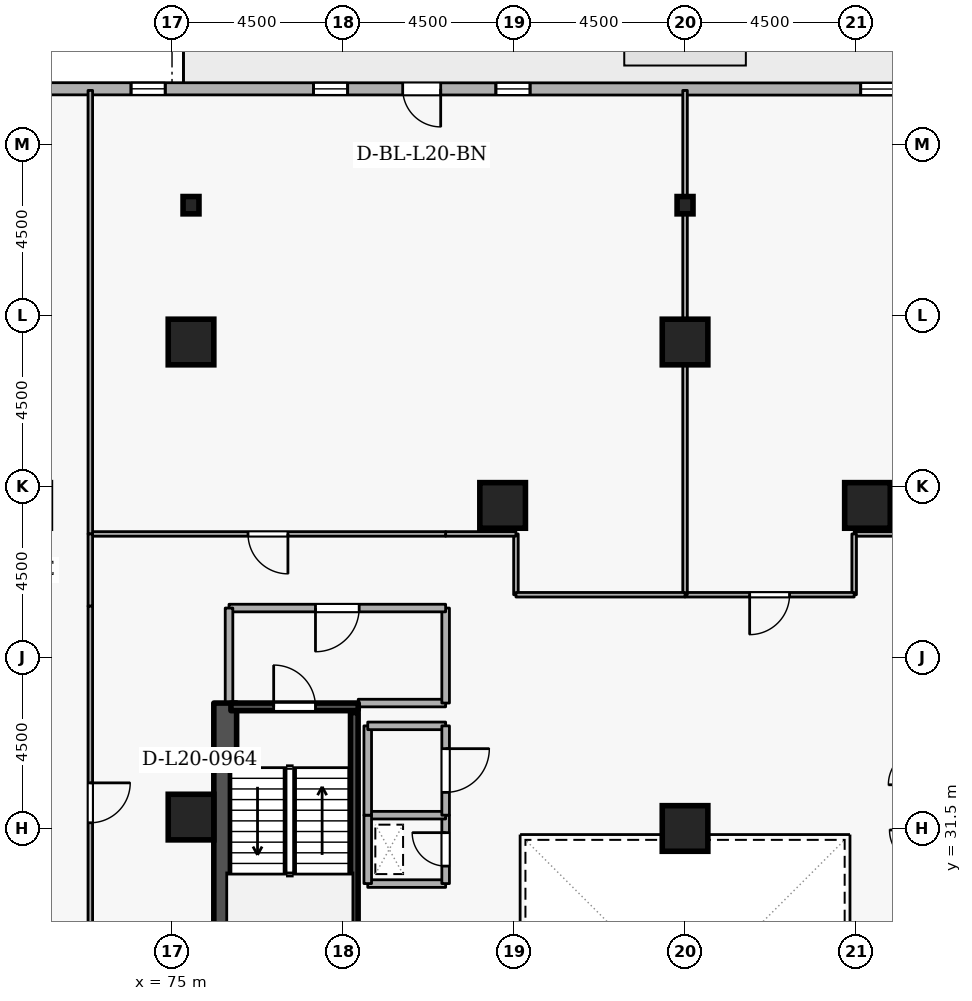
"""IFC4 building model, lengths in metres.
Left out: names, types, materials, properties, quantities, classifications, styles, units other than length and angle.
Written with IfcOpenShell. Run it as: python <this file> out.ifc"""

import sys

from ifc_helpers import new_model, si_unit, direction, frame, frame_2d, origin, origin_2d, place, context, subcontext, project, spatial, rectangle, i_section, extrude, element, fill, save


model = new_model("IFC4")
c1 = context("Model", 3, precision=1e-05, world=origin(), true_north=direction((0.0, 1.0)))
c2 = subcontext(c1, "Body", "Model", "MODEL_VIEW")
j1 = project(units=[si_unit("LENGTHUNIT", "METRE"), si_unit("PLANEANGLEUNIT", "RADIAN")], contexts=[c1])
p1 = place(None, origin())
s1 = spatial("IfcSite", under=j1, at=p1, CompositionType="ELEMENT")
p2 = place(p1, origin())
s2 = spatial("IfcBuilding", under=s1, at=p2, CompositionType="ELEMENT")
p3 = place(p2, frame((0.0, 0.0, 80.1)))
s3 = spatial("IfcBuildingStorey", under=s2, at=p3, CompositionType="ELEMENT", Elevation=80.1)
p4 = place(p3, frame((76.4, 19.2, 0.0), z_axis=(0.0, 0.0, 1.0), x_axis=(0.0, 1.0, 0.0)))
e1 = element("IfcWall", 1, at=p4, inside=s3, PredefinedType="SHEAR", context=c2, shape_type="SweptSolid", body=[
    extrude(rectangle(XDim=15.6, YDim=0.6, at=frame_2d((7.8, 0.0))), origin(), (0.0, 0.0, 1.0), 3.6),
])
for number, where, z_axis, x_axis in (
    (2, (88.5, 44.3, 0.0), (0.0, 0.0, 1.0), (1.0, 0.0, 0.0)),
    (3, (75.5, 44.3, 0.0), (0.0, 0.0, 1.0), (1.0, 0.0, 0.0)),
    (4, (93.3, 40.0, 0.0), (0.0, 0.0, 1.0), (1.0, 0.0, 0.0)),
    (5, (83.7, 40.0, 0.0), (0.0, 0.0, 1.0), (1.0, 0.0, 0.0)),
    (6, (75.5, 31.8, 0.0), (0.0, 0.0, 1.0), (1.0, 0.0, 0.0)),
    (7, (88.5, 31.5, 0.0), (0.0, 0.0, 1.0), (1.0, 0.0, 0.0)),
):
    element("IfcColumn", number, at=place(p3, frame(where, z_axis=z_axis, x_axis=x_axis)), inside=s3, PredefinedType="COLUMN", context=c2, shape_type="SweptSolid", body=[
        extrude(rectangle(XDim=1.2, YDim=1.2, at=origin_2d()), origin(), (0.0, 0.0, 1.0), 3.6),
    ])
for number, where, z_axis, x_axis in (
    (8, (88.5, 47.9, 0.0), (0.0, 0.0, 1.0), (1.0, 0.0, 0.0)),
    (9, (75.5, 47.9, 0.0), (0.0, 0.0, 1.0), (1.0, 0.0, 0.0)),
):
    element("IfcColumn", number, at=place(p3, frame(where, z_axis=z_axis, x_axis=x_axis)), inside=s3, PredefinedType="COLUMN", context=c2, shape_type="SweptSolid", body=[
        extrude(i_section(OverallWidth=0.418, OverallDepth=0.456, WebThickness=0.042, FlangeThickness=0.067, FilletRadius=0.015, at=origin_2d()), origin(), (0.0, 0.0, 1.0), 3.6),
    ])
p5 = place(p3, frame((100.622, 50.954, 0.0), z_axis=(0.0, 0.0, 1.0), x_axis=(-0.999999950907, 0.000313347115, 0.0)))
e10 = element("IfcWall", 10, at=p5, inside=s3, PredefinedType="STANDARD", context=c2, shape_type="SweptSolid", body=[
    extrude(rectangle(XDim=33.503, YDim=0.32, at=frame_2d((16.751, 0.0))), origin(), (0.0, 0.0, 1.0), 2.7),
])
p6 = place(p5, frame((18.552, 0.0, 0.0)))
e11 = element("IfcOpeningElement", 11, at=p6, cuts=e10, PredefinedType="OPENING", context=c2, shape_type="SweptSolid", body=[
    extrude(rectangle(XDim=1.0, YDim=2.08, at=frame_2d((0.5, 1.04))), frame((0.0, 0.17, 0.0), z_axis=(0.0, -1.0, 0.0), x_axis=(1.0, 0.0, 0.0)), (0.0, 0.0, 1.0), 0.34),
])
p7 = place(p5, frame((1.8, 0.0, 0.72)))
e12 = element("IfcOpeningElement", 12, at=p7, cuts=e10, PredefinedType="OPENING", context=c2, shape_type="SweptSolid", body=[
    extrude(rectangle(XDim=0.9, YDim=1.75, at=frame_2d((0.45, 0.875))), frame((0.0, 0.17, 0.0), z_axis=(0.0, -1.0, 0.0), x_axis=(1.0, 0.0, 0.0)), (0.0, 0.0, 1.0), 0.34),
])
p8 = place(p5, frame((6.6, 0.0, 0.72)))
e13 = element("IfcOpeningElement", 13, at=p8, cuts=e10, PredefinedType="OPENING", context=c2, shape_type="SweptSolid", body=[
    extrude(rectangle(XDim=0.9, YDim=1.75, at=frame_2d((0.45, 0.875))), frame((0.0, 0.17, 0.0), z_axis=(0.0, -1.0, 0.0), x_axis=(1.0, 0.0, 0.0)), (0.0, 0.0, 1.0), 0.34),
])
p9 = place(p5, frame((16.2, 0.0, 0.72)))
e14 = element("IfcOpeningElement", 14, at=p9, cuts=e10, PredefinedType="OPENING", context=c2, shape_type="SweptSolid", body=[
    extrude(rectangle(XDim=0.9, YDim=1.75, at=frame_2d((0.45, 0.875))), frame((0.0, 0.17, 0.0), z_axis=(0.0, -1.0, 0.0), x_axis=(1.0, 0.0, 0.0)), (0.0, 0.0, 1.0), 0.34),
])
p10 = place(p5, frame((21.0, 0.0, 0.72)))
e15 = element("IfcOpeningElement", 15, at=p10, cuts=e10, PredefinedType="OPENING", context=c2, shape_type="SweptSolid", body=[
    extrude(rectangle(XDim=0.9, YDim=1.75, at=frame_2d((0.45, 0.875))), frame((0.0, 0.17, 0.0), z_axis=(0.0, -1.0, 0.0), x_axis=(1.0, 0.0, 0.0)), (0.0, 0.0, 1.0), 0.34),
])
p11 = place(p5, frame((25.8, 0.0, 0.72)))
e16 = element("IfcOpeningElement", 16, at=p11, cuts=e10, PredefinedType="OPENING", context=c2, shape_type="SweptSolid", body=[
    extrude(rectangle(XDim=0.9, YDim=1.75, at=frame_2d((0.45, 0.875))), frame((0.0, 0.17, 0.0), z_axis=(0.0, -1.0, 0.0), x_axis=(1.0, 0.0, 0.0)), (0.0, 0.0, 1.0), 0.34),
])
p12 = place(p5, frame((30.6, 0.0, 0.72)))
e17 = element("IfcOpeningElement", 17, at=p12, cuts=e10, PredefinedType="OPENING", context=c2, shape_type="SweptSolid", body=[
    extrude(rectangle(XDim=0.9, YDim=1.75, at=frame_2d((0.45, 0.875))), frame((0.0, 0.17, 0.0), z_axis=(0.0, -1.0, 0.0), x_axis=(1.0, 0.0, 0.0)), (0.0, 0.0, 1.0), 0.34),
])
p13 = place(p3, frame((76.55, 34.7, 0.0), z_axis=(0.0, 0.0, 1.0), x_axis=(1.0, 0.0, 0.0)))
e18 = element("IfcWall", 18, at=p13, inside=s3, PredefinedType="SHEAR", context=c2, shape_type="SweptSolid", body=[
    extrude(rectangle(XDim=3.35, YDim=0.2, at=frame_2d((1.675, 0.0))), origin(), (0.0, 0.0, 1.0), 3.6),
])
p14 = place(p13, frame((1.125, 0.0, 0.0)))
e19 = element("IfcOpeningElement", 19, at=p14, cuts=e18, PredefinedType="OPENING", context=c2, shape_type="SweptSolid", body=[
    extrude(rectangle(XDim=1.1, YDim=2.1, at=frame_2d((0.55, 1.05))), frame((0.0, 0.11, 0.0), z_axis=(0.0, -1.0, 0.0), x_axis=(1.0, 0.0, 0.0)), (0.0, 0.0, 1.0), 0.22),
])
p15 = place(p3, frame((79.797, 27.45, 0.0), z_axis=(0.0, 0.0, 1.0), x_axis=(0.0, 1.0, 0.0)))
e20 = element("IfcWall", 20, at=p15, inside=s3, PredefinedType="SHEAR", context=c2, shape_type="SweptSolid", body=[
    extrude(rectangle(XDim=7.1, YDim=0.2, at=frame_2d((3.55, 0.0))), origin(), (0.0, 0.0, 1.0), 3.6),
])
p16 = place(p3, frame((79.9, 34.8, 0.0), z_axis=(0.0, 0.0, 1.0), x_axis=(1.0, 0.0, 0.0)))
e21 = element("IfcWall", 21, at=p16, inside=s3, PredefinedType="STANDARD", context=c2, shape_type="SweptSolid", body=[
    extrude(rectangle(XDim=2.3, YDim=0.2, at=frame_2d((1.15, 0.0))), origin(), (0.0, 0.0, 1.0), 2.545),
])
p17 = place(p3, frame((82.2, 34.8, 0.0), z_axis=(0.0, 0.0, 1.0), x_axis=(0.0, 1.0, 0.0)))
e22 = element("IfcWall", 22, at=p17, inside=s3, PredefinedType="STANDARD", context=c2, shape_type="SweptSolid", body=[
    extrude(rectangle(XDim=2.5, YDim=0.2, at=frame_2d((1.25, 0.0))), origin(), (0.0, 0.0, 1.0), 3.34),
])
p18 = place(p3, frame((82.2, 37.3, 0.0), z_axis=(0.0, 0.0, 1.0), x_axis=(-1.0, 0.0, 0.0)))
e23 = element("IfcWall", 23, at=p18, inside=s3, PredefinedType="STANDARD", context=c2, shape_type="SweptSolid", body=[
    extrude(rectangle(XDim=5.7, YDim=0.2, at=frame_2d((2.85, 0.0))), origin(), (0.0, 0.0, 1.0), 3.34),
])
p19 = place(p18, frame((2.275, 0.0, 0.0)))
e24 = element("IfcOpeningElement", 24, at=p19, cuts=e23, PredefinedType="OPENING", context=c2, shape_type="SweptSolid", body=[
    extrude(rectangle(XDim=1.15, YDim=2.1, at=frame_2d((0.575, 1.05))), frame((0.0, 0.11, 0.0), z_axis=(0.0, -1.0, 0.0), x_axis=(1.0, 0.0, 0.0)), (0.0, 0.0, 1.0), 0.22),
])
p20 = place(p3, frame((76.5, 37.3, 0.0), z_axis=(0.0, 0.0, 1.0), x_axis=(0.0, -1.0, 0.0)))
e25 = element("IfcWall", 25, at=p20, inside=s3, PredefinedType="STANDARD", context=c2, shape_type="SweptSolid", body=[
    extrude(rectangle(XDim=2.5, YDim=0.2, at=frame_2d((1.25, 0.0))), origin(), (0.0, 0.0, 1.0), 3.34),
])
p21 = place(p3, frame((80.15, 30.05, 0.0), z_axis=(0.0, 0.0, 1.0), x_axis=(1.0, 0.0, 0.0)))
e26 = element("IfcWall", 26, at=p21, inside=s3, PredefinedType="STANDARD", context=c2, shape_type="SweptSolid", body=[
    extrude(rectangle(XDim=2.05, YDim=0.2, at=frame_2d((1.025, 0.0))), origin(), (0.0, 0.0, 1.0), 3.34),
])
p22 = place(p3, frame((82.2, 30.05, 0.0), z_axis=(0.0, 0.0, 1.0), x_axis=(0.0, 1.0, 0.0)))
e27 = element("IfcWall", 27, at=p22, inside=s3, PredefinedType="STANDARD", context=c2, shape_type="SweptSolid", body=[
    extrude(rectangle(XDim=1.8, YDim=0.2, at=frame_2d((0.9, 0.0))), origin(), (0.0, 0.0, 1.0), 3.34),
])
p23 = place(p22, frame((0.46, 0.0, 0.0)))
e28 = element("IfcOpeningElement", 28, at=p23, cuts=e27, PredefinedType="OPENING", context=c2, shape_type="SweptSolid", body=[
    extrude(rectangle(XDim=0.88, YDim=2.04, at=frame_2d((0.44, 1.02))), frame((0.0, 0.11, 0.0), z_axis=(0.0, -1.0, 0.0), x_axis=(1.0, 0.0, 0.0)), (0.0, 0.0, 1.0), 0.22),
])
p24 = place(p3, frame((82.2, 31.85, 0.0), z_axis=(0.0, 0.0, 1.0), x_axis=(-1.0, 0.0, 0.0)))
e29 = element("IfcWall", 29, at=p24, inside=s3, PredefinedType="STANDARD", context=c2, shape_type="SweptSolid", body=[
    extrude(rectangle(XDim=2.05, YDim=0.2, at=frame_2d((1.025, 0.0))), origin(), (0.0, 0.0, 1.0), 3.34),
])
p25 = place(p3, frame((80.15, 31.85, 0.0), z_axis=(0.0, 0.0, 1.0), x_axis=(0.0, -1.0, 0.0)))
e30 = element("IfcWall", 30, at=p25, inside=s3, PredefinedType="STANDARD", context=c2, shape_type="SweptSolid", body=[
    extrude(rectangle(XDim=1.8, YDim=0.2, at=frame_2d((0.9, 0.0))), origin(), (0.0, 0.0, 1.0), 3.34),
])
p26 = place(p3, frame((80.15, 31.85, 0.0), z_axis=(0.0, 0.0, 1.0), x_axis=(0.0, 1.0, 0.0)))
e31 = element("IfcWall", 31, at=p26, inside=s3, PredefinedType="STANDARD", context=c2, shape_type="SweptSolid", body=[
    extrude(rectangle(XDim=2.35, YDim=0.2, at=frame_2d((1.175, 0.0))), origin(), (0.0, 0.0, 1.0), 3.34),
])
p27 = place(p3, frame((80.15, 34.2, 0.0), z_axis=(0.0, 0.0, 1.0), x_axis=(1.0, 0.0, 0.0)))
e32 = element("IfcWall", 32, at=p27, inside=s3, PredefinedType="STANDARD", context=c2, shape_type="SweptSolid", body=[
    extrude(rectangle(XDim=2.05, YDim=0.2, at=frame_2d((1.025, 0.0))), origin(), (0.0, 0.0, 1.0), 2.545),
])
p28 = place(p3, frame((82.2, 34.2, 0.0), z_axis=(0.0, 0.0, 1.0), x_axis=(0.0, -1.0, 0.0)))
e33 = element("IfcWall", 33, at=p28, inside=s3, PredefinedType="STANDARD", context=c2, shape_type="SweptSolid", body=[
    extrude(rectangle(XDim=2.35, YDim=0.2, at=frame_2d((1.175, 0.0))), origin(), (0.0, 0.0, 1.0), 3.34),
])
p29 = place(p28, frame((0.6, 0.0, 0.0)))
e34 = element("IfcOpeningElement", 34, at=p29, cuts=e33, PredefinedType="OPENING", context=c2, shape_type="SweptSolid", body=[
    extrude(rectangle(XDim=1.15, YDim=2.1, at=frame_2d((0.575, 1.05))), frame((0.0, 0.11, 0.0), z_axis=(0.0, -1.0, 0.0), x_axis=(1.0, 0.0, 0.0)), (0.0, 0.0, 1.0), 0.22),
])
p30 = place(p3, frame((94.8, 39.25, 0.0), z_axis=(0.0, 0.0, 1.0), x_axis=(-1.0, 0.0, 0.0)))
e35 = element("IfcWall", 35, at=p30, inside=s3, PredefinedType="PARTITIONING", context=c2, shape_type="SweptSolid", body=[
    extrude(rectangle(XDim=1.85, YDim=0.12, at=frame_2d((0.925, 0.0))), origin(), (0.0, 0.0, 1.0), 3.34),
])
p31 = place(p3, frame((92.95, 39.25, 0.0), z_axis=(0.0, 0.0, 1.0), x_axis=(0.0, -1.0, 0.0)))
e36 = element("IfcWall", 36, at=p31, inside=s3, PredefinedType="PARTITIONING", context=c2, shape_type="SweptSolid", body=[
    extrude(rectangle(XDim=1.6, YDim=0.12, at=frame_2d((0.8, 0.0))), origin(), (0.0, 0.0, 1.0), 3.34),
])
p32 = place(p3, frame((92.95, 37.65, 0.0), z_axis=(0.0, 0.0, 1.0), x_axis=(-1.0, 0.0, 0.0)))
e37 = element("IfcWall", 37, at=p32, inside=s3, PredefinedType="PARTITIONING", context=c2, shape_type="SweptSolid", body=[
    extrude(rectangle(XDim=4.45, YDim=0.12, at=frame_2d((2.225, 0.0))), origin(), (0.0, 0.0, 1.0), 3.34),
])
p33 = place(p32, frame((1.7, 0.0, 0.0)))
e38 = element("IfcOpeningElement", 38, at=p33, cuts=e37, PredefinedType="OPENING", context=c2, shape_type="SweptSolid", body=[
    extrude(rectangle(XDim=1.05, YDim=2.1, at=frame_2d((0.525, 1.05))), frame((0.0, 0.07, 0.0), z_axis=(0.0, -1.0, 0.0), x_axis=(1.0, 0.0, 0.0)), (0.0, 0.0, 1.0), 0.14),
])
p34 = place(p3, frame((88.5, 37.65, 0.0), z_axis=(0.0, 0.0, 1.0), x_axis=(0.0, 1.0, 0.0)))
e39 = element("IfcWall", 39, at=p34, inside=s3, PredefinedType="PARTITIONING", context=c2, shape_type="SweptSolid", body=[
    extrude(rectangle(XDim=13.27, YDim=0.12, at=frame_2d((6.635, 0.0))), origin(), (0.0, 0.0, 1.0), 2.882),
])
p35 = place(p3, frame((84.05, 37.65, 0.0), z_axis=(0.0, 0.0, 1.0), x_axis=(0.0, 1.0, 0.0)))
e40 = element("IfcWall", 40, at=p35, inside=s3, PredefinedType="PARTITIONING", context=c2, shape_type="SweptSolid", body=[
    extrude(rectangle(XDim=1.6, YDim=0.12, at=frame_2d((0.8, 0.0))), origin(), (0.0, 0.0, 1.0), 3.34),
])
p36 = place(p3, frame((84.05, 39.25, 0.0), z_axis=(0.0, 0.0, 1.0), x_axis=(-1.0, 0.0, 0.0)))
e41 = element("IfcWall", 41, at=p36, inside=s3, PredefinedType="PARTITIONING", context=c2, shape_type="SweptSolid", body=[
    extrude(rectangle(XDim=1.85, YDim=0.12, at=frame_2d((0.925, 0.0))), origin(), (0.0, 0.0, 1.0), 3.34),
])
p37 = place(p3, frame((82.2, 39.25, 0.0), z_axis=(0.0, 0.0, 1.0), x_axis=(-1.0, 0.0, 0.0)))
e42 = element("IfcWall", 42, at=p37, inside=s3, PredefinedType="PARTITIONING", context=c2, shape_type="SweptSolid", body=[
    extrude(rectangle(XDim=9.35, YDim=0.12, at=frame_2d((4.675, 0.0))), origin(), (0.0, 0.0, 1.0), 3.34),
])
p38 = place(p37, frame((4.15, 0.0, 0.0)))
e43 = element("IfcOpeningElement", 43, at=p38, cuts=e42, PredefinedType="OPENING", context=c2, shape_type="SweptSolid", body=[
    extrude(rectangle(XDim=1.05, YDim=2.1, at=frame_2d((0.525, 1.05))), frame((0.0, 0.07, 0.0), z_axis=(0.0, -1.0, 0.0), x_axis=(1.0, 0.0, 0.0)), (0.0, 0.0, 1.0), 0.14),
])
p39 = place(p3, frame((72.85, 39.25, 0.0), z_axis=(0.0, 0.0, 1.0), x_axis=(0.0, 1.0, 0.0)))
e44 = element("IfcWall", 44, at=p39, inside=s3, PredefinedType="PARTITIONING", context=c2, shape_type="SweptSolid", body=[
    extrude(rectangle(XDim=11.67, YDim=0.12, at=frame_2d((5.835, 0.0))), origin(), (0.0, 0.0, 1.0), 3.34),
])
p40 = place(p3, frame((88.5, 37.65, 0.0), z_axis=(0.0, 0.0, 1.0), x_axis=(-1.0, 0.0, 0.0)))
e45 = element("IfcWall", 45, at=p40, inside=s3, PredefinedType="PARTITIONING", context=c2, shape_type="SweptSolid", body=[
    extrude(rectangle(XDim=4.45, YDim=0.12, at=frame_2d((2.225, 0.0))), origin(), (0.0, 0.0, 1.0), 3.34),
])
p41 = place(p3, frame((72.85, 39.25, 0.0), z_axis=(0.0, 0.0, 1.0), x_axis=(0.0, -1.0, 0.0)))
e46 = element("IfcWall", 46, at=p41, inside=s3, PredefinedType="PARTITIONING", context=c2, shape_type="SweptSolid", body=[
    extrude(rectangle(XDim=1.9, YDim=0.12, at=frame_2d((0.95, 0.0))), origin(), (0.0, 0.0, 1.0), 2.895),
])
p42 = place(p3, frame((72.85, 37.35, 0.0), z_axis=(0.0, 0.0, 1.0), x_axis=(0.0, -1.0, 0.0)))
e47 = element("IfcWall", 47, at=p42, inside=s3, PredefinedType="PARTITIONING", context=c2, shape_type="SweptSolid", body=[
    extrude(rectangle(XDim=10.35, YDim=0.12, at=frame_2d((5.175, 0.0))), origin(), (0.0, 0.0, 1.0), 2.895),
])
p43 = place(p42, frame((4.65, 0.0, 0.0)))
e48 = element("IfcOpeningElement", 48, at=p43, cuts=e47, PredefinedType="OPENING", context=c2, shape_type="SweptSolid", body=[
    extrude(rectangle(XDim=1.05, YDim=2.1, at=frame_2d((0.525, 1.05))), frame((0.0, 0.07, 0.0), z_axis=(0.0, -1.0, 0.0), x_axis=(1.0, 0.0, 0.0)), (0.0, 0.0, 1.0), 0.14),
])
p44 = place(p6, origin())
e49 = element("IfcDoor", 49, at=p44, inside=s3, OperationType="SINGLE_SWING_LEFT", PredefinedType="DOOR", context=c2, shape_type="SweptSolid", body=[
    extrude(rectangle(XDim=1.0, YDim=2.08, at=frame_2d((0.5, 1.04))), frame((0.0, 0.025, 0.0), z_axis=(0.0, -1.0, 0.0), x_axis=(1.0, 0.0, 0.0)), (0.0, 0.0, 1.0), 0.05),
])
fill(e11, e49)
p45 = place(p8, origin())
e50 = element("IfcWindow", 50, at=p45, inside=s3, PartitioningType="SINGLE_PANEL", PredefinedType="WINDOW", context=c2, shape_type="SweptSolid", body=[
    extrude(rectangle(XDim=0.9, YDim=1.75, at=frame_2d((0.45, 0.875))), frame((0.0, 0.03, 0.0), z_axis=(0.0, -1.0, 0.0), x_axis=(1.0, 0.0, 0.0)), (0.0, 0.0, 1.0), 0.06),
])
fill(e13, e50)
p46 = place(p9, origin())
e51 = element("IfcWindow", 51, at=p46, inside=s3, PartitioningType="SINGLE_PANEL", PredefinedType="WINDOW", context=c2, shape_type="SweptSolid", body=[
    extrude(rectangle(XDim=0.9, YDim=1.75, at=frame_2d((0.45, 0.875))), frame((0.0, 0.03, 0.0), z_axis=(0.0, -1.0, 0.0), x_axis=(1.0, 0.0, 0.0)), (0.0, 0.0, 1.0), 0.06),
])
fill(e14, e51)
p47 = place(p10, origin())
e52 = element("IfcWindow", 52, at=p47, inside=s3, PartitioningType="SINGLE_PANEL", PredefinedType="WINDOW", context=c2, shape_type="SweptSolid", body=[
    extrude(rectangle(XDim=0.9, YDim=1.75, at=frame_2d((0.45, 0.875))), frame((0.0, 0.03, 0.0), z_axis=(0.0, -1.0, 0.0), x_axis=(1.0, 0.0, 0.0)), (0.0, 0.0, 1.0), 0.06),
])
fill(e15, e52)
p48 = place(p11, origin())
e53 = element("IfcWindow", 53, at=p48, inside=s3, PartitioningType="SINGLE_PANEL", PredefinedType="WINDOW", context=c2, shape_type="SweptSolid", body=[
    extrude(rectangle(XDim=0.9, YDim=1.75, at=frame_2d((0.45, 0.875))), frame((0.0, 0.03, 0.0), z_axis=(0.0, -1.0, 0.0), x_axis=(1.0, 0.0, 0.0)), (0.0, 0.0, 1.0), 0.06),
])
fill(e16, e53)
p49 = place(p14, origin())
e54 = element("IfcDoor", 54, at=p49, inside=s3, OperationType="SINGLE_SWING_LEFT", PredefinedType="DOOR", context=c2, shape_type="SweptSolid", body=[
    extrude(rectangle(XDim=1.1, YDim=2.1, at=frame_2d((0.55, 1.05))), frame((0.0, 0.025, 0.0), z_axis=(0.0, -1.0, 0.0), x_axis=(1.0, 0.0, 0.0)), (0.0, 0.0, 1.0), 0.05),
])
fill(e19, e54)
p50 = place(p19, origin())
e55 = element("IfcDoor", 55, at=p50, inside=s3, OperationType="SINGLE_SWING_RIGHT", PredefinedType="DOOR", context=c2, shape_type="SweptSolid", body=[
    extrude(rectangle(XDim=1.15, YDim=2.1, at=frame_2d((0.575, 1.05))), frame((0.0, 0.025, 0.0), z_axis=(0.0, -1.0, 0.0), x_axis=(1.0, 0.0, 0.0)), (0.0, 0.0, 1.0), 0.05),
])
fill(e24, e55)
p51 = place(p23, origin())
e56 = element("IfcDoor", 56, at=p51, inside=s3, OperationType="SINGLE_SWING_RIGHT", PredefinedType="DOOR", context=c2, shape_type="SweptSolid", body=[
    extrude(rectangle(XDim=0.88, YDim=2.04, at=frame_2d((0.44, 1.02))), frame((0.0, 0.025, 0.0), z_axis=(0.0, -1.0, 0.0), x_axis=(1.0, 0.0, 0.0)), (0.0, 0.0, 1.0), 0.05),
])
fill(e28, e56)
p52 = place(p29, origin())
e57 = element("IfcDoor", 57, at=p52, inside=s3, OperationType="SINGLE_SWING_LEFT", PredefinedType="DOOR", context=c2, shape_type="SweptSolid", body=[
    extrude(rectangle(XDim=1.15, YDim=2.1, at=frame_2d((0.575, 1.05))), frame((0.0, 0.025, 0.0), z_axis=(0.0, -1.0, 0.0), x_axis=(1.0, 0.0, 0.0)), (0.0, 0.0, 1.0), 0.05),
])
fill(e34, e57)
p53 = place(p33, origin())
e58 = element("IfcDoor", 58, at=p53, inside=s3, OperationType="SINGLE_SWING_RIGHT", PredefinedType="DOOR", context=c2, shape_type="SweptSolid", body=[
    extrude(rectangle(XDim=1.05, YDim=2.1, at=frame_2d((0.525, 1.05))), frame((0.0, 0.025, 0.0), z_axis=(0.0, -1.0, 0.0), x_axis=(1.0, 0.0, 0.0)), (0.0, 0.0, 1.0), 0.05),
])
fill(e38, e58)
p54 = place(p38, origin())
e59 = element("IfcDoor", 59, at=p54, inside=s3, OperationType="SINGLE_SWING_LEFT", PredefinedType="DOOR", context=c2, shape_type="SweptSolid", body=[
    extrude(rectangle(XDim=1.05, YDim=2.1, at=frame_2d((0.525, 1.05))), frame((0.0, 0.025, 0.0), z_axis=(0.0, -1.0, 0.0), x_axis=(1.0, 0.0, 0.0)), (0.0, 0.0, 1.0), 0.05),
])
fill(e43, e59)
p55 = place(p43, origin())
e60 = element("IfcDoor", 60, at=p55, inside=s3, OperationType="SINGLE_SWING_LEFT", PredefinedType="DOOR", context=c2, shape_type="SweptSolid", body=[
    extrude(rectangle(XDim=1.05, YDim=2.1, at=frame_2d((0.525, 1.05))), frame((0.0, 0.025, 0.0), z_axis=(0.0, -1.0, 0.0), x_axis=(1.0, 0.0, 0.0)), (0.0, 0.0, 1.0), 0.05),
])
fill(e48, e60)
save(model, sys.argv[1])
